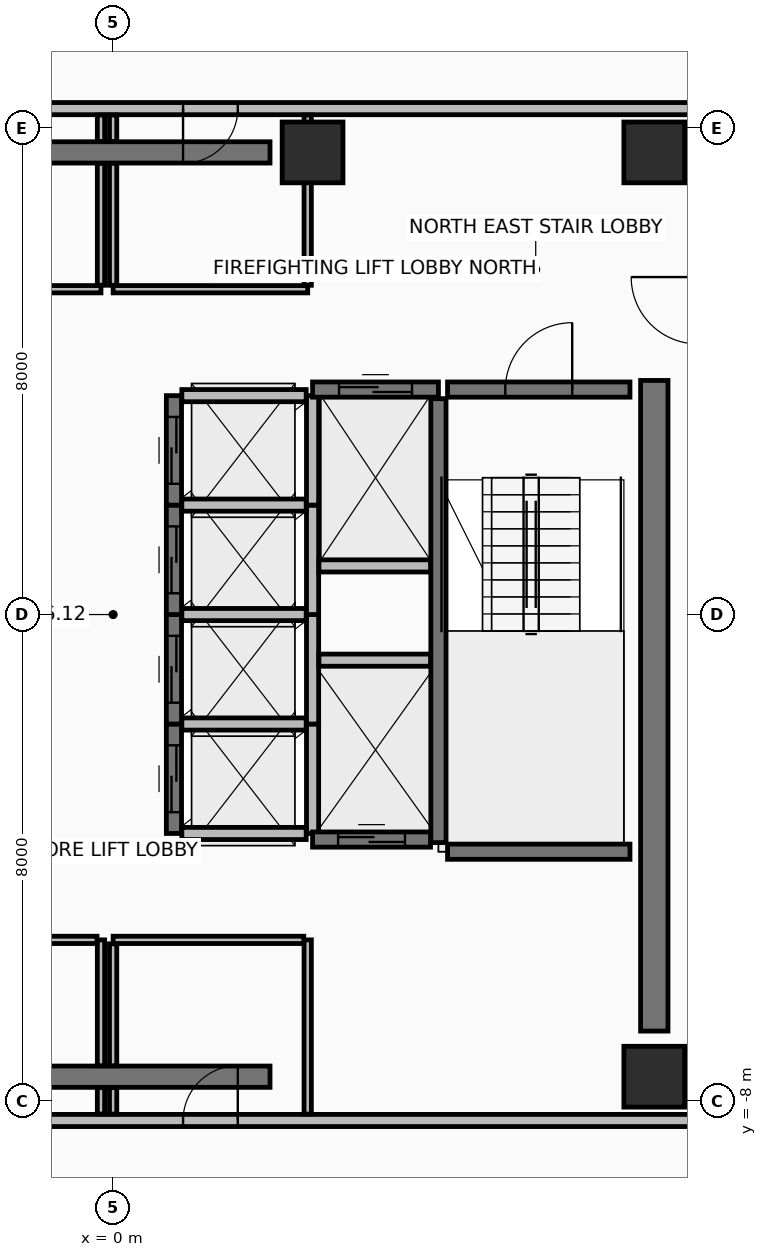
"""IFC4 building model, lengths in metres.
Left out: names, types, materials, properties, quantities, classifications, styles, units other than length and angle.
Written with IfcOpenShell. Run it as: python <this file> out.ifc"""

import sys

from ifc_helpers import new_model, si_unit, direction, frame, frame_2d, origin, origin_2d, place, context, subcontext, project, spatial, rectangle, extrude, element, fill, save


model = new_model("IFC4")
c1 = context("Model", 3, precision=1e-05, world=origin(), true_north=direction((0.0, 1.0)))
c2 = subcontext(c1, "Body", "Model", "MODEL_VIEW")
j1 = project(units=[si_unit("LENGTHUNIT", "METRE"), si_unit("PLANEANGLEUNIT", "RADIAN")], contexts=[c1])
p1 = place(None, origin())
s1 = spatial("IfcSite", under=j1, at=p1, CompositionType="ELEMENT")
p2 = place(p1, origin())
s2 = spatial("IfcBuilding", under=s1, at=p2, CompositionType="ELEMENT")
p3 = place(p2, frame((0.0, 0.0, 257.0)))
s3 = spatial("IfcBuildingStorey", under=s2, at=p3, CompositionType="ELEMENT", Elevation=257.0)
for number, where, z_axis, x_axis in (
    (1, (8.9, -7.6, 0.0), (0.0, 0.0, 1.0), (1.0, 0.0, 0.0)),
    (2, (8.9, 7.6, 0.0), (0.0, 0.0, 1.0), (1.0, 0.0, 0.0)),
    (3, (3.28, 7.6, 0.0), (0.0, 0.0, 1.0), (1.0, 0.0, 0.0)),
):
    element("IfcColumn", number, at=place(p3, frame(where, z_axis=z_axis, x_axis=x_axis)), inside=s3, PredefinedType="COLUMN", context=c2, shape_type="SweptSolid", body=[
        extrude(rectangle(XDim=1.0, YDim=1.0, at=origin_2d()), origin(), (0.0, 0.0, 1.0), 3.6),
    ])
for number, where, z_axis, x_axis in (
    (4, (-2.8, -7.6, 0.0), (0.0, 0.0, 1.0), (1.0, 0.0, 0.0)),
    (5, (-2.8, 7.6, 0.0), (0.0, 0.0, 1.0), (1.0, 0.0, 0.0)),
):
    element("IfcWall", number, at=place(p3, frame(where, z_axis=z_axis, x_axis=x_axis)), inside=s3, PredefinedType="SHEAR", context=c2, shape_type="SweptSolid", body=[
        extrude(rectangle(XDim=5.38, YDim=0.35, at=frame_2d((2.69, 0.0))), origin(), (0.0, 0.0, 1.0), 3.42),
    ])
p4 = place(p3, frame((8.9, -6.85, 0.0), z_axis=(0.0, 0.0, 1.0), x_axis=(0.0, 1.0, 0.0)))
e6 = element("IfcWall", 6, at=p4, inside=s3, PredefinedType="SHEAR", context=c2, shape_type="SweptSolid", body=[
    extrude(rectangle(XDim=10.7, YDim=0.45, at=frame_2d((5.35, 0.0))), origin(), (0.0, 0.0, 1.0), 3.42),
])
p5 = place(p3, frame((-9.62, -8.32, 0.0), z_axis=(0.0, 0.0, 1.0), x_axis=(1.0, 0.0, 0.0)))
e7 = element("IfcWall", 7, at=p5, inside=s3, PredefinedType="PARTITIONING", context=c2, shape_type="SweptSolid", body=[
    extrude(rectangle(XDim=19.24, YDim=0.2, at=frame_2d((9.62, 0.0))), origin(), (0.0, 0.0, 1.0), 2.915),
])
p6 = place(p5, frame((7.37, 0.0, 0.0)))
e8 = element("IfcOpeningElement", 8, at=p6, cuts=e7, PredefinedType="OPENING", context=c2, shape_type="SweptSolid", body=[
    extrude(rectangle(XDim=0.9, YDim=2.1, at=frame_2d((0.45, 1.05))), frame((0.0, 0.11, 0.0), z_axis=(0.0, -1.0, 0.0), x_axis=(1.0, 0.0, 0.0)), (0.0, 0.0, 1.0), 0.22),
])
p7 = place(p5, frame((10.77, 0.0, 0.0)))
e9 = element("IfcOpeningElement", 9, at=p7, cuts=e7, PredefinedType="OPENING", context=c2, shape_type="SweptSolid", body=[
    extrude(rectangle(XDim=0.9, YDim=2.1, at=frame_2d((0.45, 1.05))), frame((0.0, 0.11, 0.0), z_axis=(0.0, -1.0, 0.0), x_axis=(1.0, 0.0, 0.0)), (0.0, 0.0, 1.0), 0.22),
])
p8 = place(p3, frame((9.62, 8.32, 0.0), z_axis=(0.0, 0.0, 1.0), x_axis=(-1.0, 0.0, 0.0)))
e10 = element("IfcWall", 10, at=p8, inside=s3, PredefinedType="PARTITIONING", context=c2, shape_type="SweptSolid", body=[
    extrude(rectangle(XDim=19.24, YDim=0.2, at=frame_2d((9.62, 0.0))), origin(), (0.0, 0.0, 1.0), 2.915),
])
p9 = place(p8, frame((10.97, 0.0, 0.0)))
e11 = element("IfcOpeningElement", 11, at=p9, cuts=e10, PredefinedType="OPENING", context=c2, shape_type="SweptSolid", body=[
    extrude(rectangle(XDim=0.9, YDim=2.1, at=frame_2d((0.45, 1.05))), frame((0.0, 0.11, 0.0), z_axis=(0.0, -1.0, 0.0), x_axis=(1.0, 0.0, 0.0)), (0.0, 0.0, 1.0), 0.22),
])
p10 = place(p8, frame((7.57, 0.0, 0.0)))
e12 = element("IfcOpeningElement", 12, at=p10, cuts=e10, PredefinedType="OPENING", context=c2, shape_type="SweptSolid", body=[
    extrude(rectangle(XDim=0.9, YDim=2.1, at=frame_2d((0.45, 1.05))), frame((0.0, 0.11, 0.0), z_axis=(0.0, -1.0, 0.0), x_axis=(1.0, 0.0, 0.0)), (0.0, 0.0, 1.0), 0.22),
])
p11 = place(p8, frame((15.02, 0.0, 0.0)))
e13 = element("IfcOpeningElement", 13, at=p11, cuts=e10, PredefinedType="OPENING", context=c2, shape_type="SweptSolid", body=[
    extrude(rectangle(XDim=0.9, YDim=2.1, at=frame_2d((0.45, 1.05))), frame((0.0, 0.11, 0.0), z_axis=(0.0, -1.0, 0.0), x_axis=(1.0, 0.0, 0.0)), (0.0, 0.0, 1.0), 0.22),
])
p12 = place(p3, frame((5.35, -3.75, 0.0), z_axis=(0.0, 0.0, 1.0), x_axis=(0.0, 1.0, 0.0)))
e14 = element("IfcWall", 14, at=p12, inside=s3, PredefinedType="SHEAR", context=c2, shape_type="SweptSolid", body=[
    extrude(rectangle(XDim=7.3, YDim=0.25, at=frame_2d((3.65, 0.0))), origin(), (0.0, 0.0, 1.0), 3.42),
])
p13 = place(p3, frame((5.5, 3.7, 0.0), z_axis=(0.0, 0.0, 1.0), x_axis=(1.0, 0.0, 0.0)))
e15 = element("IfcWall", 15, at=p13, inside=s3, PredefinedType="SHEAR", context=c2, shape_type="SweptSolid", body=[
    extrude(rectangle(XDim=3.0, YDim=0.25, at=frame_2d((1.5, 0.0))), origin(), (0.0, 0.0, 1.0), 3.42),
])
p14 = place(p13, frame((0.95, 0.0, 0.0)))
e16 = element("IfcOpeningElement", 16, at=p14, cuts=e15, PredefinedType="OPENING", context=c2, shape_type="SweptSolid", body=[
    extrude(rectangle(XDim=1.1, YDim=2.15, at=frame_2d((0.55, 1.075))), frame((0.0, 0.135, 0.0), z_axis=(0.0, -1.0, 0.0), x_axis=(1.0, 0.0, 0.0)), (0.0, 0.0, 1.0), 0.27),
])
p15 = place(p3, frame((5.5, -3.9, 0.0), z_axis=(0.0, 0.0, 1.0), x_axis=(1.0, 0.0, 0.0)))
e17 = element("IfcWall", 17, at=p15, inside=s3, PredefinedType="SHEAR", context=c2, shape_type="SweptSolid", body=[
    extrude(rectangle(XDim=3.0, YDim=0.25, at=frame_2d((1.5, 0.0))), origin(), (0.0, 0.0, 1.0), 3.42),
])
p16 = place(p3, frame((1.0, -3.6, 0.0), z_axis=(0.0, 0.0, 1.0), x_axis=(0.0, 1.0, 0.0)))
e18 = element("IfcWall", 18, at=p16, inside=s3, PredefinedType="SHEAR", context=c2, shape_type="SweptSolid", body=[
    extrude(rectangle(XDim=1.8, YDim=0.25, at=frame_2d((0.9, 0.0))), origin(), (0.0, 0.0, 1.0), 3.42),
])
p17 = place(p16, frame((0.35, 0.0, 0.0)))
e19 = element("IfcOpeningElement", 19, at=p17, cuts=e18, PredefinedType="OPENING", context=c2, shape_type="SweptSolid", body=[
    extrude(rectangle(XDim=1.1, YDim=2.2, at=frame_2d((0.55, 1.1))), frame((0.0, 0.135, 0.0), z_axis=(0.0, -1.0, 0.0), x_axis=(1.0, 0.0, 0.0)), (0.0, 0.0, 1.0), 0.27),
])
p18 = place(p3, frame((3.28, -3.6, 0.0), z_axis=(0.0, 0.0, 1.0), x_axis=(0.0, 1.0, 0.0)))
e20 = element("IfcWall", 20, at=p18, inside=s3, PredefinedType="PARTITIONING", context=c2, shape_type="SweptSolid", body=[
    extrude(rectangle(XDim=1.8, YDim=0.2, at=frame_2d((0.9, 0.0))), origin(), (0.0, 0.0, 1.0), 3.42),
])
for number, where, z_axis, x_axis in (
    (21, (1.13, -3.6, 0.0), (0.0, 0.0, 1.0), (1.0, 0.0, 0.0)),
    (22, (1.13, -1.8, 0.0), (0.0, 0.0, 1.0), (1.0, 0.0, 0.0)),
):
    element("IfcWall", number, at=place(p3, frame(where, z_axis=z_axis, x_axis=x_axis)), inside=s3, PredefinedType="PARTITIONING", context=c2, shape_type="SweptSolid", body=[
        extrude(rectangle(XDim=2.045, YDim=0.2, at=frame_2d((1.022, 0.0))), origin(), (0.0, 0.0, 1.0), 3.42),
    ])
p19 = place(p3, frame((1.0, -1.8, 0.0), z_axis=(0.0, 0.0, 1.0), x_axis=(0.0, 1.0, 0.0)))
e23 = element("IfcWall", 23, at=p19, inside=s3, PredefinedType="SHEAR", context=c2, shape_type="SweptSolid", body=[
    extrude(rectangle(XDim=1.8, YDim=0.25, at=frame_2d((0.9, 0.0))), origin(), (0.0, 0.0, 1.0), 3.42),
])
p20 = place(p19, frame((0.35, 0.0, 0.0)))
e24 = element("IfcOpeningElement", 24, at=p20, cuts=e23, PredefinedType="OPENING", context=c2, shape_type="SweptSolid", body=[
    extrude(rectangle(XDim=1.1, YDim=2.2, at=frame_2d((0.55, 1.1))), frame((0.0, 0.135, 0.0), z_axis=(0.0, -1.0, 0.0), x_axis=(1.0, 0.0, 0.0)), (0.0, 0.0, 1.0), 0.27),
])
p21 = place(p3, frame((3.28, -1.8, 0.0), z_axis=(0.0, 0.0, 1.0), x_axis=(0.0, 1.0, 0.0)))
e25 = element("IfcWall", 25, at=p21, inside=s3, PredefinedType="PARTITIONING", context=c2, shape_type="SweptSolid", body=[
    extrude(rectangle(XDim=1.8, YDim=0.2, at=frame_2d((0.9, 0.0))), origin(), (0.0, 0.0, 1.0), 3.42),
])
p22 = place(p3, frame((1.13, 0.0, 0.0), z_axis=(0.0, 0.0, 1.0), x_axis=(1.0, 0.0, 0.0)))
e26 = element("IfcWall", 26, at=p22, inside=s3, PredefinedType="PARTITIONING", context=c2, shape_type="SweptSolid", body=[
    extrude(rectangle(XDim=2.045, YDim=0.2, at=frame_2d((1.022, 0.0))), origin(), (0.0, 0.0, 1.0), 3.42),
])
p23 = place(p3, frame((1.0, 0.0, 0.0), z_axis=(0.0, 0.0, 1.0), x_axis=(0.0, 1.0, 0.0)))
e27 = element("IfcWall", 27, at=p23, inside=s3, PredefinedType="SHEAR", context=c2, shape_type="SweptSolid", body=[
    extrude(rectangle(XDim=1.8, YDim=0.25, at=frame_2d((0.9, 0.0))), origin(), (0.0, 0.0, 1.0), 3.42),
])
p24 = place(p23, frame((0.35, 0.0, 0.0)))
e28 = element("IfcOpeningElement", 28, at=p24, cuts=e27, PredefinedType="OPENING", context=c2, shape_type="SweptSolid", body=[
    extrude(rectangle(XDim=1.1, YDim=2.2, at=frame_2d((0.55, 1.1))), frame((0.0, 0.135, 0.0), z_axis=(0.0, -1.0, 0.0), x_axis=(1.0, 0.0, 0.0)), (0.0, 0.0, 1.0), 0.27),
])
p25 = place(p3, frame((3.28, 0.0, 0.0), z_axis=(0.0, 0.0, 1.0), x_axis=(0.0, 1.0, 0.0)))
e29 = element("IfcWall", 29, at=p25, inside=s3, PredefinedType="PARTITIONING", context=c2, shape_type="SweptSolid", body=[
    extrude(rectangle(XDim=1.8, YDim=0.2, at=frame_2d((0.9, 0.0))), origin(), (0.0, 0.0, 1.0), 3.42),
])
p26 = place(p3, frame((1.13, 1.8, 0.0), z_axis=(0.0, 0.0, 1.0), x_axis=(1.0, 0.0, 0.0)))
e30 = element("IfcWall", 30, at=p26, inside=s3, PredefinedType="PARTITIONING", context=c2, shape_type="SweptSolid", body=[
    extrude(rectangle(XDim=2.045, YDim=0.2, at=frame_2d((1.022, 0.0))), origin(), (0.0, 0.0, 1.0), 3.42),
])
p27 = place(p3, frame((1.0, 1.8, 0.0), z_axis=(0.0, 0.0, 1.0), x_axis=(0.0, 1.0, 0.0)))
e31 = element("IfcWall", 31, at=p27, inside=s3, PredefinedType="SHEAR", context=c2, shape_type="SweptSolid", body=[
    extrude(rectangle(XDim=1.8, YDim=0.25, at=frame_2d((0.9, 0.0))), origin(), (0.0, 0.0, 1.0), 3.42),
])
p28 = place(p27, frame((0.35, 0.0, 0.0)))
e32 = element("IfcOpeningElement", 32, at=p28, cuts=e31, PredefinedType="OPENING", context=c2, shape_type="SweptSolid", body=[
    extrude(rectangle(XDim=1.1, YDim=2.2, at=frame_2d((0.55, 1.1))), frame((0.0, 0.135, 0.0), z_axis=(0.0, -1.0, 0.0), x_axis=(1.0, 0.0, 0.0)), (0.0, 0.0, 1.0), 0.27),
])
p29 = place(p3, frame((3.28, 1.8, 0.0), z_axis=(0.0, 0.0, 1.0), x_axis=(0.0, 1.0, 0.0)))
e33 = element("IfcWall", 33, at=p29, inside=s3, PredefinedType="PARTITIONING", context=c2, shape_type="SweptSolid", body=[
    extrude(rectangle(XDim=1.8, YDim=0.2, at=frame_2d((0.9, 0.0))), origin(), (0.0, 0.0, 1.0), 3.42),
])
p30 = place(p3, frame((1.13, 3.6, 0.0), z_axis=(0.0, 0.0, 1.0), x_axis=(1.0, 0.0, 0.0)))
e34 = element("IfcWall", 34, at=p30, inside=s3, PredefinedType="PARTITIONING", context=c2, shape_type="SweptSolid", body=[
    extrude(rectangle(XDim=2.045, YDim=0.2, at=frame_2d((1.022, 0.0))), origin(), (0.0, 0.0, 1.0), 2.715),
])
p31 = place(p3, frame((3.28, 3.7, 0.0), z_axis=(0.0, 0.0, 1.0), x_axis=(1.0, 0.0, 0.0)))
e35 = element("IfcWall", 35, at=p31, inside=s3, PredefinedType="SHEAR", context=c2, shape_type="SweptSolid", body=[
    extrude(rectangle(XDim=2.07, YDim=0.25, at=frame_2d((1.035, 0.0))), origin(), (0.0, 0.0, 1.0), 3.42),
])
p32 = place(p31, frame((0.435, 0.0, 0.0)))
e36 = element("IfcOpeningElement", 36, at=p32, cuts=e35, PredefinedType="OPENING", context=c2, shape_type="SweptSolid", body=[
    extrude(rectangle(XDim=1.2, YDim=2.2, at=frame_2d((0.6, 1.1))), frame((0.0, 0.135, 0.0), z_axis=(0.0, -1.0, 0.0), x_axis=(1.0, 0.0, 0.0)), (0.0, 0.0, 1.0), 0.27),
])
p33 = place(p3, frame((3.385, 0.8, 0.0), z_axis=(0.0, 0.0, 1.0), x_axis=(1.0, 0.0, 0.0)))
e37 = element("IfcWall", 37, at=p33, inside=s3, PredefinedType="PARTITIONING", context=c2, shape_type="SweptSolid", body=[
    extrude(rectangle(XDim=1.835, YDim=0.2, at=frame_2d((0.917, 0.0))), origin(), (0.0, 0.0, 1.0), 3.42),
])
p34 = place(p3, frame((3.28, -3.7, 0.0), z_axis=(0.0, 0.0, 1.0), x_axis=(1.0, 0.0, 0.0)))
e38 = element("IfcWall", 38, at=p34, inside=s3, PredefinedType="SHEAR", context=c2, shape_type="SweptSolid", body=[
    extrude(rectangle(XDim=1.94, YDim=0.25, at=frame_2d((0.97, 0.0))), origin(), (0.0, 0.0, 1.0), 3.42),
])
p35 = place(p34, frame((0.42, 0.0, 0.0)))
e39 = element("IfcOpeningElement", 39, at=p35, cuts=e38, PredefinedType="OPENING", context=c2, shape_type="SweptSolid", body=[
    extrude(rectangle(XDim=1.1, YDim=2.2, at=frame_2d((0.55, 1.1))), frame((0.0, 0.135, 0.0), z_axis=(0.0, -1.0, 0.0), x_axis=(1.0, 0.0, 0.0)), (0.0, 0.0, 1.0), 0.27),
])
p36 = place(p3, frame((3.385, -0.75, 0.0), z_axis=(0.0, 0.0, 1.0), x_axis=(1.0, 0.0, 0.0)))
e40 = element("IfcWall", 40, at=p36, inside=s3, PredefinedType="PARTITIONING", context=c2, shape_type="SweptSolid", body=[
    extrude(rectangle(XDim=1.835, YDim=0.2, at=frame_2d((0.917, 0.0))), origin(), (0.0, 0.0, 1.0), 3.42),
])
p37 = place(p3, frame((-0.2, -8.215, 0.0), z_axis=(0.0, 0.0, 1.0), x_axis=(0.0, 1.0, 0.0)))
e41 = element("IfcWall", 41, at=p37, inside=s3, PredefinedType="PARTITIONING", context=c2, shape_type="SweptSolid", body=[
    extrude(rectangle(XDim=0.435, YDim=0.12, at=frame_2d((0.218, 0.0))), origin(), (0.0, 0.0, 1.0), 2.715),
])
p38 = place(p3, frame((-0.2, -7.42, 0.0), z_axis=(0.0, 0.0, 1.0), x_axis=(0.0, 1.0, 0.0)))
e42 = element("IfcWall", 42, at=p38, inside=s3, PredefinedType="PARTITIONING", context=c2, shape_type="SweptSolid", body=[
    extrude(rectangle(XDim=2.07, YDim=0.12, at=frame_2d((1.035, 0.0))), origin(), (0.0, 0.0, 1.0), 2.715),
])
p39 = place(p3, frame((-0.265, -5.35, 0.0), z_axis=(0.0, 0.0, 1.0), x_axis=(-1.0, 0.0, 0.0)))
e43 = element("IfcWall", 43, at=p39, inside=s3, PredefinedType="PARTITIONING", context=c2, shape_type="SweptSolid", body=[
    extrude(rectangle(XDim=3.135, YDim=0.12, at=frame_2d((1.567, 0.0))), origin(), (0.0, 0.0, 1.0), 2.715),
])
p40 = place(p3, frame((3.2, -8.215, 0.0), z_axis=(0.0, 0.0, 1.0), x_axis=(0.0, 1.0, 0.0)))
e44 = element("IfcWall", 44, at=p40, inside=s3, PredefinedType="PARTITIONING", context=c2, shape_type="SweptSolid", body=[
    extrude(rectangle(XDim=2.865, YDim=0.12, at=frame_2d((1.433, 0.0))), origin(), (0.0, 0.0, 1.0), 2.715),
])
p41 = place(p3, frame((3.135, -5.35, 0.0), z_axis=(0.0, 0.0, 1.0), x_axis=(-1.0, 0.0, 0.0)))
e45 = element("IfcWall", 45, at=p41, inside=s3, PredefinedType="PARTITIONING", context=c2, shape_type="SweptSolid", body=[
    extrude(rectangle(XDim=3.135, YDim=0.12, at=frame_2d((1.567, 0.0))), origin(), (0.0, 0.0, 1.0), 3.42),
])
p42 = place(p3, frame((0.0, -5.415, 0.0), z_axis=(0.0, 0.0, 1.0), x_axis=(0.0, -1.0, 0.0)))
e46 = element("IfcWall", 46, at=p42, inside=s3, PredefinedType="PARTITIONING", context=c2, shape_type="SweptSolid", body=[
    extrude(rectangle(XDim=2.005, YDim=0.12, at=frame_2d((1.002, 0.0))), origin(), (0.0, 0.0, 1.0), 2.715),
])
p43 = place(p3, frame((0.0, -7.78, 0.0), z_axis=(0.0, 0.0, 1.0), x_axis=(0.0, -1.0, 0.0)))
e47 = element("IfcWall", 47, at=p43, inside=s3, PredefinedType="PARTITIONING", context=c2, shape_type="SweptSolid", body=[
    extrude(rectangle(XDim=0.435, YDim=0.12, at=frame_2d((0.218, 0.0))), origin(), (0.0, 0.0, 1.0), 2.715),
])
p44 = place(p3, frame((-3.4, 5.35, 0.0), z_axis=(0.0, 0.0, 1.0), x_axis=(1.0, 0.0, 0.0)))
e48 = element("IfcWall", 48, at=p44, inside=s3, PredefinedType="PARTITIONING", context=c2, shape_type="SweptSolid", body=[
    extrude(rectangle(XDim=3.2, YDim=0.12, at=frame_2d((1.6, 0.0))), origin(), (0.0, 0.0, 1.0), 3.42),
])
p45 = place(p3, frame((-0.2, 5.415, 0.0), z_axis=(0.0, 0.0, 1.0), x_axis=(0.0, 1.0, 0.0)))
e49 = element("IfcWall", 49, at=p45, inside=s3, PredefinedType="PARTITIONING", context=c2, shape_type="SweptSolid", body=[
    extrude(rectangle(XDim=2.005, YDim=0.12, at=frame_2d((1.002, 0.0))), origin(), (0.0, 0.0, 1.0), 2.715),
])
p46 = place(p3, frame((-0.2, 7.78, 0.0), z_axis=(0.0, 0.0, 1.0), x_axis=(0.0, 1.0, 0.0)))
e50 = element("IfcWall", 50, at=p46, inside=s3, PredefinedType="PARTITIONING", context=c2, shape_type="SweptSolid", body=[
    extrude(rectangle(XDim=0.435, YDim=0.12, at=frame_2d((0.218, 0.0))), origin(), (0.0, 0.0, 1.0), 2.715),
])
p47 = place(p3, frame((0.0, 5.35, 0.0), z_axis=(0.0, 0.0, 1.0), x_axis=(1.0, 0.0, 0.0)))
e51 = element("IfcWall", 51, at=p47, inside=s3, PredefinedType="PARTITIONING", context=c2, shape_type="SweptSolid", body=[
    extrude(rectangle(XDim=3.2, YDim=0.12, at=frame_2d((1.6, 0.0))), origin(), (0.0, 0.0, 1.0), 2.715),
])
p48 = place(p3, frame((3.2, 5.415, 0.0), z_axis=(0.0, 0.0, 1.0), x_axis=(0.0, 1.0, 0.0)))
e52 = element("IfcWall", 52, at=p48, inside=s3, PredefinedType="PARTITIONING", context=c2, shape_type="SweptSolid", body=[
    extrude(rectangle(XDim=2.8, YDim=0.12, at=frame_2d((1.4, 0.0))), origin(), (0.0, 0.0, 1.0), 2.715),
])
p49 = place(p3, frame((0.0, 8.215, 0.0), z_axis=(0.0, 0.0, 1.0), x_axis=(0.0, -1.0, 0.0)))
e53 = element("IfcWall", 53, at=p49, inside=s3, PredefinedType="PARTITIONING", context=c2, shape_type="SweptSolid", body=[
    extrude(rectangle(XDim=0.435, YDim=0.12, at=frame_2d((0.218, 0.0))), origin(), (0.0, 0.0, 1.0), 2.715),
])
p50 = place(p3, frame((0.0, 7.42, 0.0), z_axis=(0.0, 0.0, 1.0), x_axis=(0.0, -1.0, 0.0)))
e54 = element("IfcWall", 54, at=p50, inside=s3, PredefinedType="PARTITIONING", context=c2, shape_type="SweptSolid", body=[
    extrude(rectangle(XDim=2.005, YDim=0.12, at=frame_2d((1.002, 0.0))), origin(), (0.0, 0.0, 1.0), 2.715),
])
p51 = place(p14, frame((1.1, 0.0, 0.0), z_axis=(0.0, 0.0, 1.0), x_axis=(-1.0, 0.0, 0.0)))
e55 = element("IfcDoor", 55, at=p51, inside=s3, OperationType="SINGLE_SWING_LEFT", PredefinedType="DOOR", context=c2, shape_type="SweptSolid", body=[
    extrude(rectangle(XDim=1.1, YDim=2.15, at=frame_2d((0.55, 1.075))), frame((0.0, 0.025, 0.0), z_axis=(0.0, -1.0, 0.0), x_axis=(1.0, 0.0, 0.0)), (0.0, 0.0, 1.0), 0.05),
])
fill(e16, e55)
p52 = place(p17, origin())
e56 = element("IfcDoor", 56, at=p52, inside=s3, OperationType="SLIDING_TO_LEFT", PredefinedType="DOOR", context=c2, shape_type="SweptSolid", body=[
    extrude(rectangle(XDim=1.1, YDim=2.2, at=frame_2d((0.55, 1.1))), frame((0.0, 0.025, 0.0), z_axis=(0.0, -1.0, 0.0), x_axis=(1.0, 0.0, 0.0)), (0.0, 0.0, 1.0), 0.05),
])
fill(e19, e56)
p53 = place(p20, origin())
e57 = element("IfcDoor", 57, at=p53, inside=s3, OperationType="SLIDING_TO_LEFT", PredefinedType="DOOR", context=c2, shape_type="SweptSolid", body=[
    extrude(rectangle(XDim=1.1, YDim=2.2, at=frame_2d((0.55, 1.1))), frame((0.0, 0.025, 0.0), z_axis=(0.0, -1.0, 0.0), x_axis=(1.0, 0.0, 0.0)), (0.0, 0.0, 1.0), 0.05),
])
fill(e24, e57)
p54 = place(p24, origin())
e58 = element("IfcDoor", 58, at=p54, inside=s3, OperationType="SLIDING_TO_LEFT", PredefinedType="DOOR", context=c2, shape_type="SweptSolid", body=[
    extrude(rectangle(XDim=1.1, YDim=2.2, at=frame_2d((0.55, 1.1))), frame((0.0, 0.025, 0.0), z_axis=(0.0, -1.0, 0.0), x_axis=(1.0, 0.0, 0.0)), (0.0, 0.0, 1.0), 0.05),
])
fill(e28, e58)
p55 = place(p28, origin())
e59 = element("IfcDoor", 59, at=p55, inside=s3, OperationType="SLIDING_TO_LEFT", PredefinedType="DOOR", context=c2, shape_type="SweptSolid", body=[
    extrude(rectangle(XDim=1.1, YDim=2.2, at=frame_2d((0.55, 1.1))), frame((0.0, 0.025, 0.0), z_axis=(0.0, -1.0, 0.0), x_axis=(1.0, 0.0, 0.0)), (0.0, 0.0, 1.0), 0.05),
])
fill(e32, e59)
p56 = place(p32, origin())
e60 = element("IfcDoor", 60, at=p56, inside=s3, OperationType="SLIDING_TO_RIGHT", PredefinedType="DOOR", context=c2, shape_type="SweptSolid", body=[
    extrude(rectangle(XDim=1.2, YDim=2.2, at=frame_2d((0.6, 1.1))), frame((0.0, 0.025, 0.0), z_axis=(0.0, -1.0, 0.0), x_axis=(1.0, 0.0, 0.0)), (0.0, 0.0, 1.0), 0.05),
])
fill(e36, e60)
p57 = place(p35, origin())
e61 = element("IfcDoor", 61, at=p57, inside=s3, OperationType="SLIDING_TO_LEFT", PredefinedType="DOOR", context=c2, shape_type="SweptSolid", body=[
    extrude(rectangle(XDim=1.1, YDim=2.2, at=frame_2d((0.55, 1.1))), frame((0.0, 0.025, 0.0), z_axis=(0.0, -1.0, 0.0), x_axis=(1.0, 0.0, 0.0)), (0.0, 0.0, 1.0), 0.05),
])
fill(e39, e61)
p58 = place(p7, frame((0.9, 0.0, 0.0), z_axis=(0.0, 0.0, 1.0), x_axis=(-1.0, 0.0, 0.0)))
e62 = element("IfcDoor", 62, at=p58, inside=s3, OperationType="SINGLE_SWING_LEFT", PredefinedType="DOOR", context=c2, shape_type="SweptSolid", body=[
    extrude(rectangle(XDim=0.9, YDim=2.1, at=frame_2d((0.45, 1.05))), frame((0.0, 0.025, 0.0), z_axis=(0.0, -1.0, 0.0), x_axis=(1.0, 0.0, 0.0)), (0.0, 0.0, 1.0), 0.05),
])
fill(e9, e62)
p59 = place(p10, frame((0.9, 0.0, 0.0), z_axis=(0.0, 0.0, 1.0), x_axis=(-1.0, 0.0, 0.0)))
e63 = element("IfcDoor", 63, at=p59, inside=s3, OperationType="SINGLE_SWING_LEFT", PredefinedType="DOOR", context=c2, shape_type="SweptSolid", body=[
    extrude(rectangle(XDim=0.9, YDim=2.1, at=frame_2d((0.45, 1.05))), frame((0.0, 0.025, 0.0), z_axis=(0.0, -1.0, 0.0), x_axis=(1.0, 0.0, 0.0)), (0.0, 0.0, 1.0), 0.05),
])
fill(e12, e63)
save(model, sys.argv[1])
